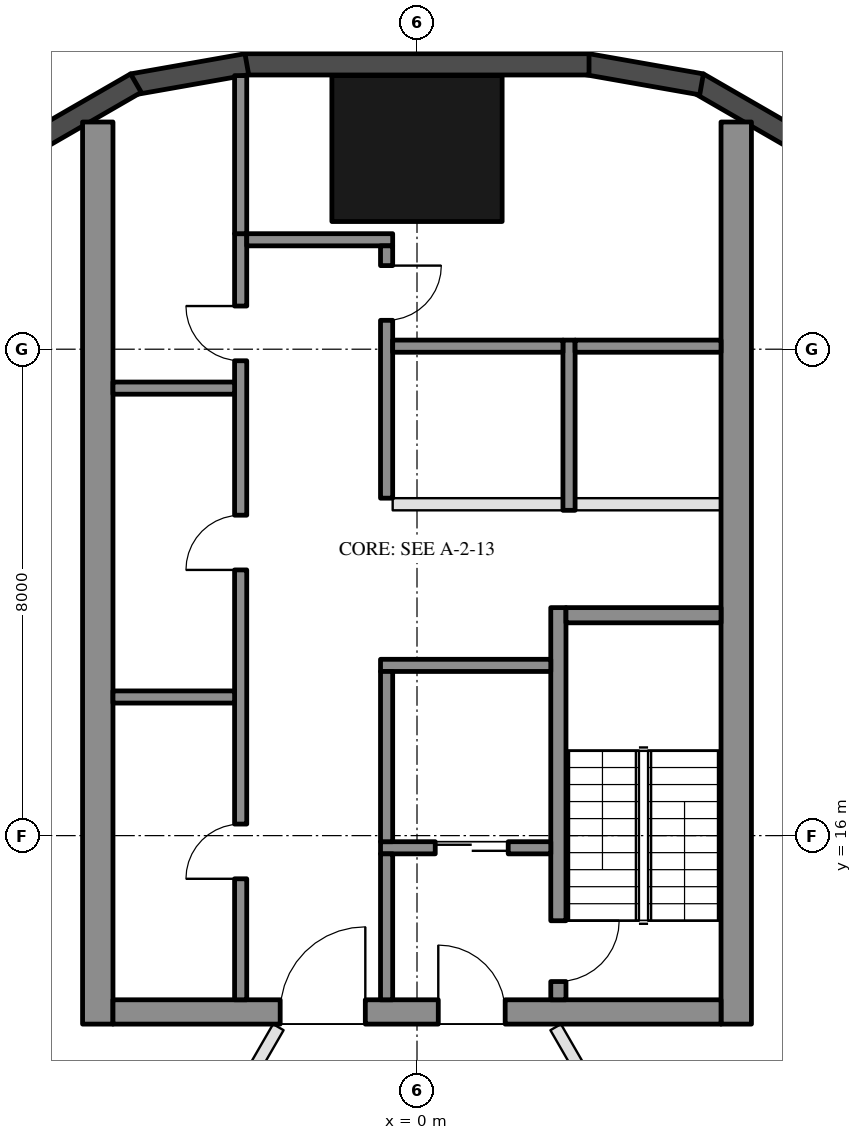
"""IFC4 building model, lengths in metres.
Left out: names, types, materials, properties, quantities, classifications, styles, units other than length and angle.
Written with IfcOpenShell. Run it as: python <this file> out.ifc"""

import sys

from ifc_helpers import new_model, si_unit, direction, frame, frame_2d, origin, origin_2d, place, context, subcontext, project, spatial, rectangle, hollow_rectangle, extrude, element, fill, save


model = new_model("IFC4")
c1 = context("Model", 3, precision=1e-05, world=origin(), true_north=direction((0.0, 1.0)))
c2 = subcontext(c1, "Body", "Model", "MODEL_VIEW")
j1 = project(units=[si_unit("LENGTHUNIT", "METRE"), si_unit("PLANEANGLEUNIT", "RADIAN")], contexts=[c1])
p1 = place(None, origin())
s1 = spatial("IfcSite", under=j1, at=p1, CompositionType="ELEMENT")
p2 = place(p1, origin())
s2 = spatial("IfcBuilding", under=s1, at=p2, CompositionType="ELEMENT")
p3 = place(p2, frame((0.0, 0.0, 68.7)))
s3 = spatial("IfcBuildingStorey", under=s2, at=p3, CompositionType="ELEMENT", Elevation=68.7)
p4 = place(p3, frame((0.0, 27.3, 0.0), z_axis=(0.0, 0.0, 1.0), x_axis=(1.0, 0.0, 0.0)))
e1 = element("IfcColumn", 1, at=p4, inside=s3, PredefinedType="COLUMN", context=c2, shape_type="SweptSolid", body=[
    extrude(hollow_rectangle(XDim=2.8, YDim=2.4, WallThickness=0.07, at=origin_2d()), origin(), (0.0, 0.0, 1.0), 3.7),
])
for number, where, z_axis, x_axis in (
    (2, (6.277, 27.422, 0.0), (0.0, 0.0, 1.0), (-0.866, 0.5, 0.0)),
    (3, (4.68, 28.356, 0.0), (0.0, 0.0, 1.0), (-0.985, 0.174, 0.0)),
):
    element("IfcWall", number, at=place(p3, frame(where, z_axis=z_axis, x_axis=x_axis)), inside=s3, PredefinedType="SOLIDWALL", context=c2, shape_type="SweptSolid", body=[
        extrude(rectangle(XDim=1.91, YDim=0.35, at=frame_2d((0.955, 0.0))), origin(), (0.0, 0.0, 1.0), 3.55),
    ])
p5 = place(p3, frame((2.829, 28.685, 0.0), z_axis=(0.0, 0.0, 1.0), x_axis=(-1.0, 0.0, 0.0)))
e4 = element("IfcWall", 4, at=p5, inside=s3, PredefinedType="SOLIDWALL", context=c2, shape_type="SweptSolid", body=[
    extrude(rectangle(XDim=5.658, YDim=0.35, at=frame_2d((2.829, 0.0))), origin(), (0.0, 0.0, 1.0), 3.55),
])
for number, where, z_axis, x_axis in (
    (5, (-2.799, 28.688, 0.0), (0.0, 0.0, 1.0), (-0.985, -0.174, 0.0)),
    (6, (-4.623, 28.377, 0.0), (0.0, 0.0, 1.0), (-0.866, -0.5, 0.0)),
):
    element("IfcWall", number, at=place(p3, frame(where, z_axis=z_axis, x_axis=x_axis)), inside=s3, PredefinedType="SOLIDWALL", context=c2, shape_type="SweptSolid", body=[
        extrude(rectangle(XDim=1.91, YDim=0.35, at=frame_2d((0.955, 0.0))), origin(), (0.0, 0.0, 1.0), 3.55),
    ])
for number, where, z_axis, x_axis in (
    (7, (5.25, 12.9, 0.0), (0.0, 0.0, 1.0), (0.0, 1.0, 0.0)),
    (8, (-5.25, 12.9, 0.0), (0.0, 0.0, 1.0), (0.0, 1.0, 0.0)),
):
    element("IfcWall", number, at=place(p3, frame(where, z_axis=z_axis, x_axis=x_axis)), inside=s3, PredefinedType="SHEAR", context=c2, shape_type="SweptSolid", body=[
        extrude(rectangle(XDim=14.837, YDim=0.5, at=frame_2d((7.418, 0.0))), origin(), (0.0, 0.0, 1.0), 3.5),
    ])
p6 = place(p3, frame((5.0, 13.1, 0.0), z_axis=(0.0, 0.0, 1.0), x_axis=(-1.0, 0.0, 0.0)))
e9 = element("IfcWall", 9, at=p6, inside=s3, PredefinedType="SHEAR", context=c2, shape_type="SweptSolid", body=[
    extrude(rectangle(XDim=10.0, YDim=0.4, at=frame_2d((5.0, 0.0))), origin(), (0.0, 0.0, 1.0), 3.5),
])
p7 = place(p6, frame((3.55, 0.0, 0.0)))
e10 = element("IfcOpeningElement", 10, at=p7, cuts=e9, PredefinedType="OPENING", context=c2, shape_type="SweptSolid", body=[
    extrude(rectangle(XDim=1.1, YDim=2.1, at=frame_2d((0.55, 1.05))), frame((0.0, 0.21, 0.0), z_axis=(0.0, -1.0, 0.0), x_axis=(1.0, 0.0, 0.0)), (0.0, 0.0, 1.0), 0.42),
])
p8 = place(p6, frame((5.85, 0.0, 0.0)))
e11 = element("IfcOpeningElement", 11, at=p8, cuts=e9, PredefinedType="OPENING", context=c2, shape_type="SweptSolid", body=[
    extrude(rectangle(XDim=1.4, YDim=2.1, at=frame_2d((0.7, 1.05))), frame((0.0, 0.21, 0.0), z_axis=(0.0, -1.0, 0.0), x_axis=(1.0, 0.0, 0.0)), (0.0, 0.0, 1.0), 0.42),
])
p9 = place(p3, frame((2.325, 13.3, 0.0), z_axis=(0.0, 0.0, 1.0), x_axis=(0.0, 1.0, 0.0)))
e12 = element("IfcWall", 12, at=p9, inside=s3, PredefinedType="SHEAR", context=c2, shape_type="SweptSolid", body=[
    extrude(rectangle(XDim=6.45, YDim=0.25, at=frame_2d((3.225, 0.0))), origin(), (0.0, 0.0, 1.0), 3.5),
])
p10 = place(p9, frame((0.3, 0.0, 0.0)))
e13 = element("IfcOpeningElement", 13, at=p10, cuts=e12, PredefinedType="OPENING", context=c2, shape_type="SweptSolid", body=[
    extrude(rectangle(XDim=1.0, YDim=2.1, at=frame_2d((0.5, 1.05))), frame((0.0, 0.135, 0.0), z_axis=(0.0, -1.0, 0.0), x_axis=(1.0, 0.0, 0.0)), (0.0, 0.0, 1.0), 0.27),
])
p11 = place(p3, frame((5.0, 19.625, 0.0), z_axis=(0.0, 0.0, 1.0), x_axis=(-1.0, 0.0, 0.0)))
e14 = element("IfcWall", 14, at=p11, inside=s3, PredefinedType="SHEAR", context=c2, shape_type="SweptSolid", body=[
    extrude(rectangle(XDim=2.55, YDim=0.25, at=frame_2d((1.275, 0.0))), origin(), (0.0, 0.0, 1.0), 3.5),
])
p12 = place(p3, frame((2.2, 18.8, 0.0), z_axis=(0.0, 0.0, 1.0), x_axis=(-1.0, 0.0, 0.0)))
e15 = element("IfcWall", 15, at=p12, inside=s3, PredefinedType="SHEAR", context=c2, shape_type="SweptSolid", body=[
    extrude(rectangle(XDim=2.8, YDim=0.2, at=frame_2d((1.4, 0.0))), origin(), (0.0, 0.0, 1.0), 3.5),
])
p13 = place(p3, frame((2.2, 15.8, 0.0), z_axis=(0.0, 0.0, 1.0), x_axis=(-1.0, 0.0, 0.0)))
e16 = element("IfcWall", 16, at=p13, inside=s3, PredefinedType="SHEAR", context=c2, shape_type="SweptSolid", body=[
    extrude(rectangle(XDim=2.8, YDim=0.2, at=frame_2d((1.4, 0.0))), origin(), (0.0, 0.0, 1.0), 3.5),
])
p14 = place(p13, frame((0.7, 0.0, 0.0)))
e17 = element("IfcOpeningElement", 17, at=p14, cuts=e16, PredefinedType="OPENING", context=c2, shape_type="SweptSolid", body=[
    extrude(rectangle(XDim=1.2, YDim=2.1, at=frame_2d((0.6, 1.05))), frame((0.0, 0.11, 0.0), z_axis=(0.0, -1.0, 0.0), x_axis=(1.0, 0.0, 0.0)), (0.0, 0.0, 1.0), 0.22),
])
p15 = place(p3, frame((-0.5, 15.9, 0.0), z_axis=(0.0, 0.0, 1.0), x_axis=(0.0, 1.0, 0.0)))
e18 = element("IfcWall", 18, at=p15, inside=s3, PredefinedType="SHEAR", context=c2, shape_type="SweptSolid", body=[
    extrude(rectangle(XDim=2.8, YDim=0.2, at=frame_2d((1.4, 0.0))), origin(), (0.0, 0.0, 1.0), 3.5),
])
p16 = place(p3, frame((-0.5, 13.3, 0.0), z_axis=(0.0, 0.0, 1.0), x_axis=(0.0, 1.0, 0.0)))
e19 = element("IfcWall", 19, at=p16, inside=s3, PredefinedType="SHEAR", context=c2, shape_type="SweptSolid", body=[
    extrude(rectangle(XDim=2.4, YDim=0.2, at=frame_2d((1.2, 0.0))), origin(), (0.0, 0.0, 1.0), 3.5),
])
p17 = place(p3, frame((-2.9, 13.3, 0.0), z_axis=(0.0, 0.0, 1.0), x_axis=(0.0, 1.0, 0.0)))
e20 = element("IfcWall", 20, at=p17, inside=s3, PredefinedType="SHEAR", context=c2, shape_type="SweptSolid", body=[
    extrude(rectangle(XDim=12.6, YDim=0.2, at=frame_2d((6.3, 0.0))), origin(), (0.0, 0.0, 1.0), 3.5),
])
p18 = place(p17, frame((1.99, 0.0, 0.0)))
e21 = element("IfcOpeningElement", 21, at=p18, cuts=e20, PredefinedType="OPENING", context=c2, shape_type="SweptSolid", body=[
    extrude(rectangle(XDim=0.9, YDim=2.1, at=frame_2d((0.45, 1.05))), frame((0.0, 0.11, 0.0), z_axis=(0.0, -1.0, 0.0), x_axis=(1.0, 0.0, 0.0)), (0.0, 0.0, 1.0), 0.22),
])
p19 = place(p17, frame((7.07, 0.0, 0.0)))
e22 = element("IfcOpeningElement", 22, at=p19, cuts=e20, PredefinedType="OPENING", context=c2, shape_type="SweptSolid", body=[
    extrude(rectangle(XDim=0.9, YDim=2.1, at=frame_2d((0.45, 1.05))), frame((0.0, 0.11, 0.0), z_axis=(0.0, -1.0, 0.0), x_axis=(1.0, 0.0, 0.0)), (0.0, 0.0, 1.0), 0.22),
])
p20 = place(p17, frame((10.51, 0.0, 0.0)))
e23 = element("IfcOpeningElement", 23, at=p20, cuts=e20, PredefinedType="OPENING", context=c2, shape_type="SweptSolid", body=[
    extrude(rectangle(XDim=0.9, YDim=2.1, at=frame_2d((0.45, 1.05))), frame((0.0, 0.11, 0.0), z_axis=(0.0, -1.0, 0.0), x_axis=(1.0, 0.0, 0.0)), (0.0, 0.0, 1.0), 0.22),
])
p21 = place(p3, frame((-0.4, 25.8, 0.0), z_axis=(0.0, 0.0, 1.0), x_axis=(-1.0, 0.0, 0.0)))
e24 = element("IfcWall", 24, at=p21, inside=s3, PredefinedType="SHEAR", context=c2, shape_type="SweptSolid", body=[
    extrude(rectangle(XDim=2.4, YDim=0.2, at=frame_2d((1.2, 0.0))), origin(), (0.0, 0.0, 1.0), 3.5),
])
p22 = place(p3, frame((-0.5, 21.55, 0.0), z_axis=(0.0, 0.0, 1.0), x_axis=(0.0, 1.0, 0.0)))
e25 = element("IfcWall", 25, at=p22, inside=s3, PredefinedType="SHEAR", context=c2, shape_type="SweptSolid", body=[
    extrude(rectangle(XDim=4.15, YDim=0.2, at=frame_2d((2.075, 0.0))), origin(), (0.0, 0.0, 1.0), 3.5),
])
p23 = place(p22, frame((2.925, 0.0, 0.0)))
e26 = element("IfcOpeningElement", 26, at=p23, cuts=e25, PredefinedType="OPENING", context=c2, shape_type="SweptSolid", body=[
    extrude(rectangle(XDim=0.9, YDim=2.1, at=frame_2d((0.45, 1.05))), frame((0.0, 0.11, 0.0), z_axis=(0.0, -1.0, 0.0), x_axis=(1.0, 0.0, 0.0)), (0.0, 0.0, 1.0), 0.22),
])
for number, where, z_axis, x_axis in (
    (27, (-3.0, 18.28, 0.0), (0.0, 0.0, 1.0), (-1.0, 0.0, 0.0)),
    (28, (-3.0, 23.36, 0.0), (0.0, 0.0, 1.0), (-1.0, 0.0, 0.0)),
):
    element("IfcWall", number, at=place(p3, frame(where, z_axis=z_axis, x_axis=x_axis)), inside=s3, PredefinedType="SHEAR", context=c2, shape_type="SweptSolid", body=[
        extrude(rectangle(XDim=2.0, YDim=0.2, at=frame_2d((1.0, 0.0))), origin(), (0.0, 0.0, 1.0), 3.5),
    ])
p24 = place(p3, frame((-2.9, 25.9, 0.0), z_axis=(0.0, 0.0, 1.0), x_axis=(0.0, 1.0, 0.0)))
e29 = element("IfcWall", 29, at=p24, inside=s3, PredefinedType="SHEAR", context=c2, shape_type="SweptSolid", body=[
    extrude(rectangle(XDim=2.6, YDim=0.2, at=frame_2d((1.3, 0.0))), origin(), (0.0, 0.0, 1.0), 3.5),
])
p25 = place(p3, frame((2.5, 21.35, 0.0), z_axis=(0.0, 0.0, 1.0), x_axis=(0.0, 1.0, 0.0)))
e30 = element("IfcWall", 30, at=p25, inside=s3, PredefinedType="SHEAR", context=c2, shape_type="SweptSolid", body=[
    extrude(rectangle(XDim=2.8, YDim=0.2, at=frame_2d((1.4, 0.0))), origin(), (0.0, 0.0, 1.0), 3.5),
])
p26 = place(p3, frame((5.0, 24.05, 0.0), z_axis=(0.0, 0.0, 1.0), x_axis=(-1.0, 0.0, 0.0)))
e31 = element("IfcWall", 31, at=p26, inside=s3, PredefinedType="SHEAR", context=c2, shape_type="SweptSolid", body=[
    extrude(rectangle(XDim=2.4, YDim=0.2, at=frame_2d((1.2, 0.0))), origin(), (0.0, 0.0, 1.0), 3.5),
])
p27 = place(p3, frame((2.4, 24.05, 0.0), z_axis=(0.0, 0.0, 1.0), x_axis=(-1.0, 0.0, 0.0)))
e32 = element("IfcWall", 32, at=p27, inside=s3, PredefinedType="SHEAR", context=c2, shape_type="SweptSolid", body=[
    extrude(rectangle(XDim=2.8, YDim=0.2, at=frame_2d((1.4, 0.0))), origin(), (0.0, 0.0, 1.0), 3.5),
])
p28 = place(p3, frame((5.0, 21.45, 0.0), z_axis=(0.0, 0.0, 1.0), x_axis=(-1.0, 0.0, 0.0)))
e33 = element("IfcWall", 33, at=p28, inside=s3, PredefinedType="PARTITIONING", context=c2, shape_type="SweptSolid", body=[
    extrude(rectangle(XDim=2.4, YDim=0.2, at=frame_2d((1.2, 0.0))), origin(), (0.0, 0.0, 1.0), 3.5),
])
p29 = place(p3, frame((2.4, 21.45, 0.0), z_axis=(0.0, 0.0, 1.0), x_axis=(-1.0, 0.0, 0.0)))
e34 = element("IfcWall", 34, at=p29, inside=s3, PredefinedType="PARTITIONING", context=c2, shape_type="SweptSolid", body=[
    extrude(rectangle(XDim=2.8, YDim=0.2, at=frame_2d((1.4, 0.0))), origin(), (0.0, 0.0, 1.0), 3.5),
])
p30 = place(p3, frame((2.281, 12.85, 0.0), z_axis=(0.0, 0.0, 1.0), x_axis=(0.499992939664, -0.866029480033, 0.0)))
e35 = element("IfcWall", 35, at=p30, inside=s3, PredefinedType="PARTITIONING", context=c2, shape_type="SweptSolid", body=[
    extrude(rectangle(XDim=7.188, YDim=0.2, at=frame_2d((3.594, 0.0))), origin(), (0.0, 0.0, 1.0), 2.95),
])
p31 = place(p30, frame((3.094, 0.0, 0.0)))
e36 = element("IfcOpeningElement", 36, at=p31, cuts=e35, PredefinedType="OPENING", context=c2, shape_type="SweptSolid", body=[
    extrude(rectangle(XDim=1.0, YDim=2.1, at=frame_2d((0.5, 1.05))), frame((0.0, 0.11, 0.0), z_axis=(0.0, -1.0, 0.0), x_axis=(1.0, 0.0, 0.0)), (0.0, 0.0, 1.0), 0.22),
])
p32 = place(p3, frame((-5.922, 6.542, 0.0), z_axis=(0.0, 0.0, 1.0), x_axis=(0.499989401968, 0.866031522475, 0.0)))
e37 = element("IfcWall", 37, at=p32, inside=s3, PredefinedType="PARTITIONING", context=c2, shape_type="SweptSolid", body=[
    extrude(rectangle(XDim=7.283, YDim=0.2, at=frame_2d((3.642, 0.0))), origin(), (0.0, 0.0, 1.0), 2.95),
])
p33 = place(p32, frame((3.142, 0.0, 0.0)))
e38 = element("IfcOpeningElement", 38, at=p33, cuts=e37, PredefinedType="OPENING", context=c2, shape_type="SweptSolid", body=[
    extrude(rectangle(XDim=1.0, YDim=2.1, at=frame_2d((0.5, 1.05))), frame((0.0, 0.11, 0.0), z_axis=(0.0, -1.0, 0.0), x_axis=(1.0, 0.0, 0.0)), (0.0, 0.0, 1.0), 0.22),
])
p34 = place(p14, origin())
e39 = element("IfcDoor", 39, at=p34, inside=s3, OperationType="DOUBLE_DOOR_SLIDING", PredefinedType="DOOR", context=c2, shape_type="SweptSolid", body=[
    extrude(rectangle(XDim=1.2, YDim=2.1, at=frame_2d((0.6, 1.05))), frame((0.0, 0.025, 0.0), z_axis=(0.0, -1.0, 0.0), x_axis=(1.0, 0.0, 0.0)), (0.0, 0.0, 1.0), 0.05),
])
fill(e17, e39)
p35 = place(p18, origin())
e40 = element("IfcDoor", 40, at=p35, inside=s3, OperationType="SINGLE_SWING_LEFT", PredefinedType="DOOR", context=c2, shape_type="SweptSolid", body=[
    extrude(rectangle(XDim=0.9, YDim=2.1, at=frame_2d((0.45, 1.05))), frame((0.0, 0.025, 0.0), z_axis=(0.0, -1.0, 0.0), x_axis=(1.0, 0.0, 0.0)), (0.0, 0.0, 1.0), 0.05),
])
fill(e21, e40)
p36 = place(p19, origin())
e41 = element("IfcDoor", 41, at=p36, inside=s3, OperationType="SINGLE_SWING_LEFT", PredefinedType="DOOR", context=c2, shape_type="SweptSolid", body=[
    extrude(rectangle(XDim=0.9, YDim=2.1, at=frame_2d((0.45, 1.05))), frame((0.0, 0.025, 0.0), z_axis=(0.0, -1.0, 0.0), x_axis=(1.0, 0.0, 0.0)), (0.0, 0.0, 1.0), 0.05),
])
fill(e22, e41)
p37 = place(p20, origin())
e42 = element("IfcDoor", 42, at=p37, inside=s3, OperationType="SINGLE_SWING_RIGHT", PredefinedType="DOOR", context=c2, shape_type="SweptSolid", body=[
    extrude(rectangle(XDim=0.9, YDim=2.1, at=frame_2d((0.45, 1.05))), frame((0.0, 0.025, 0.0), z_axis=(0.0, -1.0, 0.0), x_axis=(1.0, 0.0, 0.0)), (0.0, 0.0, 1.0), 0.05),
])
fill(e23, e42)
p38 = place(p23, frame((0.9, 0.0, 0.0), z_axis=(0.0, 0.0, 1.0), x_axis=(-1.0, 0.0, 0.0)))
e43 = element("IfcDoor", 43, at=p38, inside=s3, OperationType="SINGLE_SWING_LEFT", PredefinedType="DOOR", context=c2, shape_type="SweptSolid", body=[
    extrude(rectangle(XDim=0.9, YDim=2.1, at=frame_2d((0.45, 1.05))), frame((0.0, 0.025, 0.0), z_axis=(0.0, -1.0, 0.0), x_axis=(1.0, 0.0, 0.0)), (0.0, 0.0, 1.0), 0.05),
])
fill(e26, e43)
p39 = place(p7, frame((1.1, 0.0, 0.0), z_axis=(0.0, 0.0, 1.0), x_axis=(-1.0, 0.0, 0.0)))
e44 = element("IfcDoor", 44, at=p39, inside=s3, OperationType="SINGLE_SWING_LEFT", PredefinedType="DOOR", context=c2, shape_type="SweptSolid", body=[
    extrude(rectangle(XDim=1.1, YDim=2.1, at=frame_2d((0.55, 1.05))), frame((0.0, 0.025, 0.0), z_axis=(0.0, -1.0, 0.0), x_axis=(1.0, 0.0, 0.0)), (0.0, 0.0, 1.0), 0.05),
])
fill(e10, e44)
p40 = place(p8, frame((1.4, 0.0, 0.0), z_axis=(0.0, 0.0, 1.0), x_axis=(-1.0, 0.0, 0.0)))
e45 = element("IfcDoor", 45, at=p40, inside=s3, OperationType="DOUBLE_DOOR_SINGLE_SWING", PredefinedType="DOOR", context=c2, shape_type="SweptSolid", body=[
    extrude(rectangle(XDim=1.4, YDim=2.1, at=frame_2d((0.7, 1.05))), frame((0.0, 0.025, 0.0), z_axis=(0.0, -1.0, 0.0), x_axis=(1.0, 0.0, 0.0)), (0.0, 0.0, 1.0), 0.05),
])
fill(e11, e45)
p41 = place(p10, frame((1.0, 0.0, 0.0), z_axis=(0.0, 0.0, 1.0), x_axis=(-1.0, 0.0, 0.0)))
e46 = element("IfcDoor", 46, at=p41, inside=s3, OperationType="SINGLE_SWING_LEFT", PredefinedType="DOOR", context=c2, shape_type="SweptSolid", body=[
    extrude(rectangle(XDim=1.0, YDim=2.1, at=frame_2d((0.5, 1.05))), frame((0.0, 0.025, 0.0), z_axis=(0.0, -1.0, 0.0), x_axis=(1.0, 0.0, 0.0)), (0.0, 0.0, 1.0), 0.05),
])
fill(e13, e46)
save(model, sys.argv[1])
